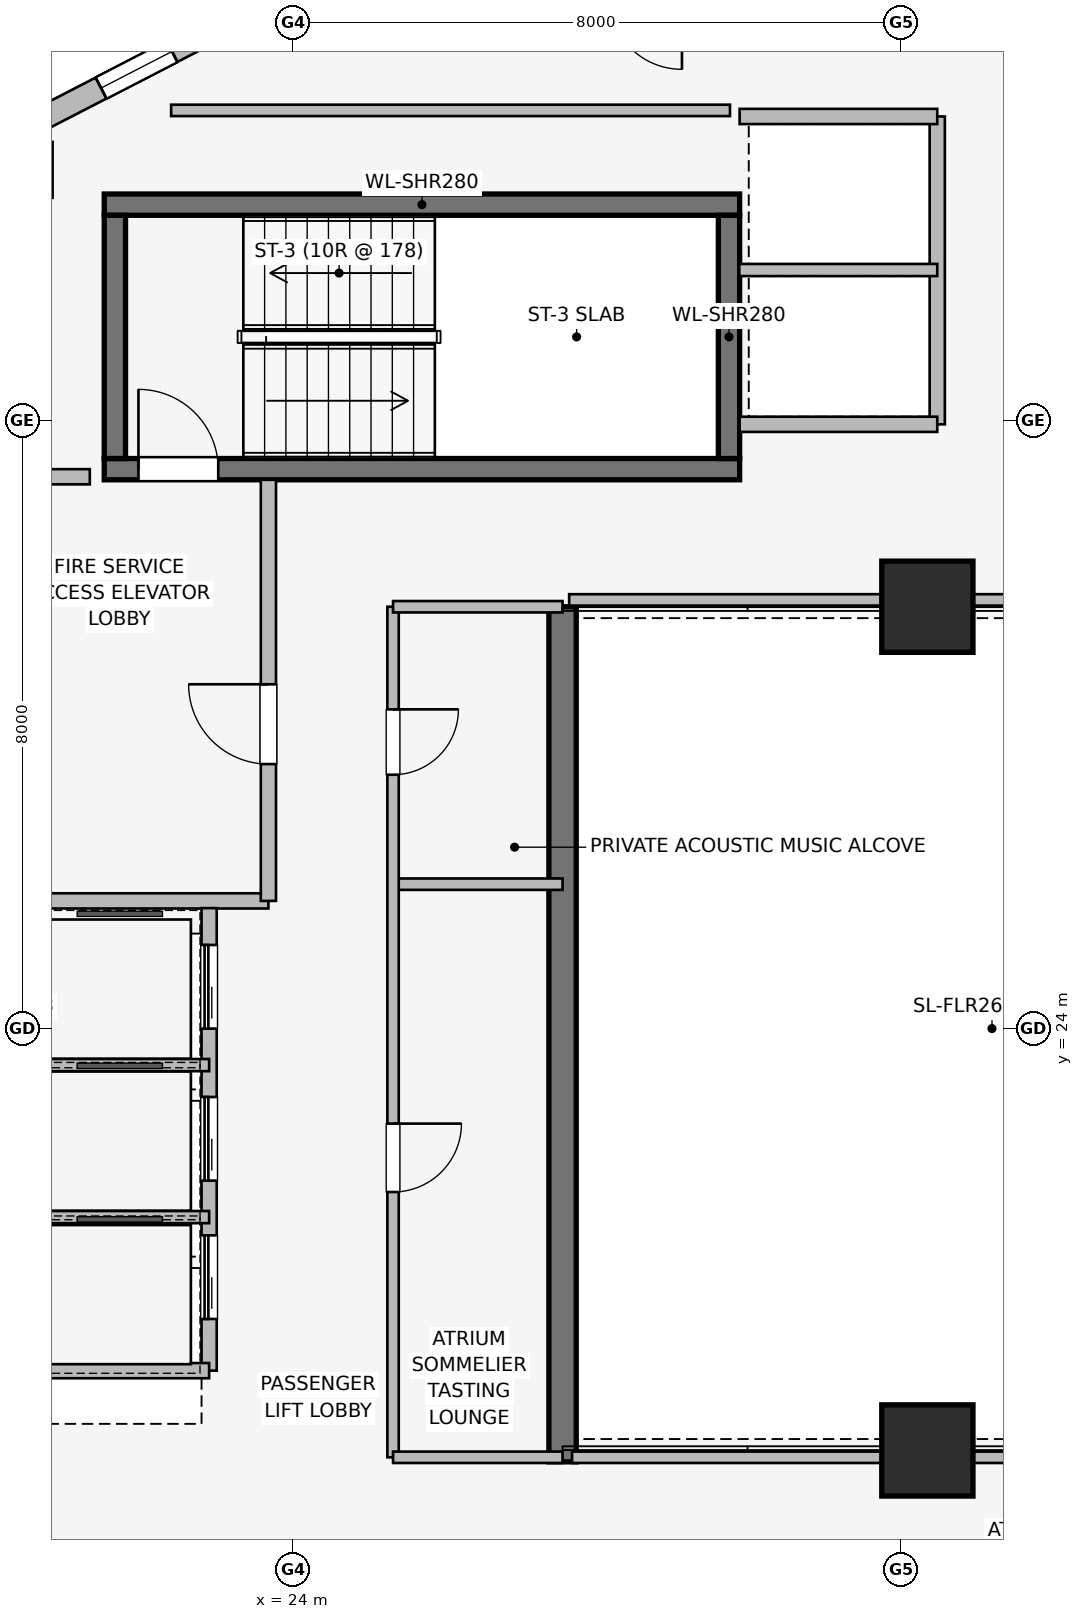
"""IFC4 building model, lengths in metres.
Left out: names, types, materials, properties, quantities, classifications, styles, units other than length and angle.
Written with IfcOpenShell. Run it as: python <this file> out.ifc"""

import sys

from ifc_helpers import new_model, si_unit, direction, frame, frame_2d, origin, origin_2d, place, context, subcontext, project, spatial, rectangle, extrude, element, fill, save


model = new_model("IFC4")
c1 = context("Model", 3, precision=1e-05, world=origin(), true_north=direction((0.0, 1.0)))
c2 = subcontext(c1, "Body", "Model", "MODEL_VIEW")
j1 = project(units=[si_unit("LENGTHUNIT", "METRE"), si_unit("PLANEANGLEUNIT", "RADIAN")], contexts=[c1])
p1 = place(None, origin())
s1 = spatial("IfcSite", under=j1, at=p1, CompositionType="ELEMENT")
p2 = place(p1, origin())
s2 = spatial("IfcBuilding", under=s1, at=p2, CompositionType="ELEMENT")
p3 = place(p2, frame((0.0, 0.0, 224.15)))
s3 = spatial("IfcBuildingStorey", under=s2, at=p3, CompositionType="ELEMENT", Elevation=224.15)
p4 = place(p3, frame((27.55, 29.55, 0.0), z_axis=(0.0, 0.0, 1.0), x_axis=(0.0, -1.0, 0.0)))
e1 = element("IfcWall", 1, at=p4, inside=s3, PredefinedType="SHEAR", context=c2, shape_type="SweptSolid", body=[
    extrude(rectangle(XDim=11.25, YDim=0.36, at=frame_2d((5.625, 0.0))), origin(), (0.0, 0.0, 1.0), 3.55),
])
p5 = place(p3, frame((21.52, 31.36, 0.0), z_axis=(0.0, 0.0, 1.0), x_axis=(1.0, 0.0, 0.0)))
e2 = element("IfcWall", 2, at=p5, inside=s3, PredefinedType="SHEAR", context=c2, shape_type="SweptSolid", body=[
    extrude(rectangle(XDim=8.36, YDim=0.28, at=frame_2d((4.18, 0.0))), origin(), (0.0, 0.0, 1.0), 3.55),
])
p6 = place(p5, frame((0.45, 0.0, 0.0)))
e3 = element("IfcOpeningElement", 3, at=p6, cuts=e2, PredefinedType="OPENING", context=c2, shape_type="SweptSolid", body=[
    extrude(rectangle(XDim=1.05, YDim=2.0, at=frame_2d((0.525, 1.0))), frame((0.0, 0.15, 0.0), z_axis=(0.0, -1.0, 0.0), x_axis=(1.0, 0.0, 0.0)), (0.0, 0.0, 1.0), 0.3),
])
p7 = place(p3, frame((29.88, 34.84, 0.0), z_axis=(0.0, 0.0, 1.0), x_axis=(-1.0, 0.0, 0.0)))
e4 = element("IfcWall", 4, at=p7, inside=s3, PredefinedType="SHEAR", context=c2, shape_type="SweptSolid", body=[
    extrude(rectangle(XDim=8.36, YDim=0.28, at=frame_2d((4.18, 0.0))), origin(), (0.0, 0.0, 1.0), 3.55),
])
for number, where, z_axis, x_axis in (
    (5, (21.66, 34.7, 0.0), (0.0, 0.0, 1.0), (0.0, -1.0, 0.0)),
    (6, (29.74, 31.5, 0.0), (0.0, 0.0, 1.0), (0.0, 1.0, 0.0)),
):
    element("IfcWall", number, at=place(p3, frame(where, z_axis=z_axis, x_axis=x_axis)), inside=s3, PredefinedType="SHEAR", context=c2, shape_type="SweptSolid", body=[
        extrude(rectangle(XDim=3.2, YDim=0.28, at=frame_2d((1.6, 0.0))), origin(), (0.0, 0.0, 1.0), 3.55),
    ])
for number, where, z_axis, x_axis in (
    (7, (32.35, 18.45, 0.0), (0.0, 0.0, 1.0), (1.0, 0.0, 0.0)),
    (8, (32.35, 29.55, 0.0), (0.0, 0.0, 1.0), (1.0, 0.0, 0.0)),
):
    element("IfcColumn", number, at=place(p3, frame(where, z_axis=z_axis, x_axis=x_axis)), inside=s3, PredefinedType="COLUMN", context=c2, shape_type="SweptSolid", body=[
        extrude(rectangle(XDim=1.2, YDim=1.2, at=origin_2d()), origin(), (0.0, 0.0, 1.0), 3.55),
    ])
p8 = place(p3, frame((17.566, 34.354, 0.0), z_axis=(0.0, 0.0, 1.0), x_axis=(0.888581481622, 0.458718814218, 0.0)))
e9 = element("IfcWall", 9, at=p8, inside=s3, PredefinedType="STANDARD", context=c2, shape_type="SweptSolid", body=[
    extrude(rectangle(XDim=15.077, YDim=0.31, at=frame_2d((7.539, 0.0))), origin(), (0.0, 0.0, 1.0), 3.29),
])
p9 = place(p8, frame((0.998, 0.0, 0.75)))
e10 = element("IfcOpeningElement", 10, at=p9, cuts=e9, PredefinedType="OPENING", context=c2, shape_type="SweptSolid", body=[
    extrude(rectangle(XDim=1.05, YDim=1.4, at=frame_2d((0.525, 0.7))), frame((0.0, 0.165, 0.0), z_axis=(0.0, -1.0, 0.0), x_axis=(1.0, 0.0, 0.0)), (0.0, 0.0, 1.0), 0.33),
])
p10 = place(p8, frame((4.403, 0.0, 0.75)))
e11 = element("IfcOpeningElement", 11, at=p10, cuts=e9, PredefinedType="OPENING", context=c2, shape_type="SweptSolid", body=[
    extrude(rectangle(XDim=1.05, YDim=1.4, at=frame_2d((0.525, 0.7))), frame((0.0, 0.165, 0.0), z_axis=(0.0, -1.0, 0.0), x_axis=(1.0, 0.0, 0.0)), (0.0, 0.0, 1.0), 0.33),
])
p11 = place(p8, frame((8.086, 0.0, 0.75)))
e12 = element("IfcOpeningElement", 12, at=p11, cuts=e9, PredefinedType="OPENING", context=c2, shape_type="SweptSolid", body=[
    extrude(rectangle(XDim=2.4, YDim=1.6, at=frame_2d((1.2, 0.8))), frame((0.0, 0.165, 0.0), z_axis=(0.0, -1.0, 0.0), x_axis=(1.0, 0.0, 0.0)), (0.0, 0.0, 1.0), 0.33),
])
p12 = place(p8, frame((13.029, 0.0, 0.75)))
e13 = element("IfcOpeningElement", 13, at=p12, cuts=e9, PredefinedType="OPENING", context=c2, shape_type="SweptSolid", body=[
    extrude(rectangle(XDim=1.05, YDim=1.4, at=frame_2d((0.525, 0.7))), frame((0.0, 0.165, 0.0), z_axis=(0.0, -1.0, 0.0), x_axis=(1.0, 0.0, 0.0)), (0.0, 0.0, 1.0), 0.33),
])
p13 = place(p3, frame((20.793, 25.68, 0.0), z_axis=(0.0, 0.0, 1.0), x_axis=(1.0, 0.0, 0.0)))
e14 = element("IfcWall", 14, at=p13, inside=s3, PredefinedType="PARTITIONING", context=c2, shape_type="SweptSolid", body=[
    extrude(rectangle(XDim=2.887, YDim=0.2, at=frame_2d((1.443, 0.0))), origin(), (0.0, 0.0, 1.0), 3.29),
])
p14 = place(p3, frame((23.68, 25.68, 0.0), z_axis=(0.0, 0.0, 1.0), x_axis=(0.0, 1.0, 0.0)))
e15 = element("IfcWall", 15, at=p14, inside=s3, PredefinedType="PARTITIONING", context=c2, shape_type="SweptSolid", body=[
    extrude(rectangle(XDim=5.54, YDim=0.2, at=frame_2d((2.77, 0.0))), origin(), (0.0, 0.0, 1.0), 3.29),
])
p15 = place(p14, frame((1.8, 0.0, 0.0)))
e16 = element("IfcOpeningElement", 16, at=p15, cuts=e15, PredefinedType="OPENING", context=c2, shape_type="SweptSolid", body=[
    extrude(rectangle(XDim=1.05, YDim=2.0, at=frame_2d((0.525, 1.0))), frame((0.0, 0.11, 0.0), z_axis=(0.0, -1.0, 0.0), x_axis=(1.0, 0.0, 0.0)), (0.0, 0.0, 1.0), 0.22),
])
p16 = place(p3, frame((21.33, 31.26, 0.0), z_axis=(0.0, 0.0, 1.0), x_axis=(-1.0, 0.0, 0.0)))
e17 = element("IfcWall", 17, at=p16, inside=s3, PredefinedType="PARTITIONING", context=c2, shape_type="SweptSolid", body=[
    extrude(rectangle(XDim=1.68, YDim=0.2, at=frame_2d((0.84, 0.0))), origin(), (0.0, 0.0, 1.0), 3.29),
])
p17 = place(p3, frame((32.48, 31.95, 0.0), z_axis=(0.0, 0.0, 1.0), x_axis=(0.0, 1.0, 0.0)))
e18 = element("IfcWall", 18, at=p17, inside=s3, PredefinedType="PARTITIONING", context=c2, shape_type="SweptSolid", body=[
    extrude(rectangle(XDim=4.05, YDim=0.2, at=frame_2d((2.025, 0.0))), origin(), (0.0, 0.0, 1.0), 3.29),
])
for number, where, z_axis, x_axis in (
    (19, (29.88, 36.0, 0.0), (0.0, 0.0, 1.0), (1.0, 0.0, 0.0)),
    (20, (32.48, 31.95, 0.0), (0.0, 0.0, 1.0), (-1.0, 0.0, 0.0)),
):
    element("IfcWall", number, at=place(p3, frame(where, z_axis=z_axis, x_axis=x_axis)), inside=s3, PredefinedType="PARTITIONING", context=c2, shape_type="SweptSolid", body=[
        extrude(rectangle(XDim=2.6, YDim=0.2, at=frame_2d((1.3, 0.0))), origin(), (0.0, 0.0, 1.0), 3.29),
    ])
p18 = place(p3, frame((29.875, 33.98, 0.0), z_axis=(0.0, 0.0, 1.0), x_axis=(1.0, 0.0, 0.0)))
e21 = element("IfcWall", 21, at=p18, inside=s3, PredefinedType="PARTITIONING", context=c2, shape_type="SweptSolid", body=[
    extrude(rectangle(XDim=2.605, YDim=0.16, at=frame_2d((1.302, 0.0))), origin(), (0.0, 0.0, 1.0), 3.29),
])
p19 = place(p3, frame((22.9, 19.5, 0.0), z_axis=(0.0, 0.0, 1.0), x_axis=(0.0, 1.0, 0.0)))
e22 = element("IfcWall", 22, at=p19, inside=s3, PredefinedType="PARTITIONING", context=c2, shape_type="SweptSolid", body=[
    extrude(rectangle(XDim=6.085, YDim=0.2, at=frame_2d((3.042, 0.0))), origin(), (0.0, 0.0, 1.0), 3.29),
])
p20 = place(p19, frame((0.68, 0.0, 0.0)))
e23 = element("IfcOpeningElement", 23, at=p20, cuts=e22, PredefinedType="OPENING", context=c2, shape_type="SweptSolid", body=[
    extrude(rectangle(XDim=1.1, YDim=2.2, at=frame_2d((0.55, 1.1))), frame((0.0, 0.11, 0.0), z_axis=(0.0, -1.0, 0.0), x_axis=(1.0, 0.0, 0.0)), (0.0, 0.0, 1.0), 0.22),
])
p21 = place(p19, frame((2.5, 0.0, 0.0)))
e24 = element("IfcOpeningElement", 24, at=p21, cuts=e22, PredefinedType="OPENING", context=c2, shape_type="SweptSolid", body=[
    extrude(rectangle(XDim=1.1, YDim=2.2, at=frame_2d((0.55, 1.1))), frame((0.0, 0.11, 0.0), z_axis=(0.0, -1.0, 0.0), x_axis=(1.0, 0.0, 0.0)), (0.0, 0.0, 1.0), 0.22),
])
p22 = place(p19, frame((4.5, 0.0, 0.0)))
e25 = element("IfcOpeningElement", 25, at=p22, cuts=e22, PredefinedType="OPENING", context=c2, shape_type="SweptSolid", body=[
    extrude(rectangle(XDim=1.1, YDim=2.2, at=frame_2d((0.55, 1.1))), frame((0.0, 0.11, 0.0), z_axis=(0.0, -1.0, 0.0), x_axis=(1.0, 0.0, 0.0)), (0.0, 0.0, 1.0), 0.22),
])
p23 = place(p3, frame((20.49, 19.5, 0.0), z_axis=(0.0, 0.0, 1.0), x_axis=(1.0, 0.0, 0.0)))
e26 = element("IfcWall", 26, at=p23, inside=s3, PredefinedType="PARTITIONING", context=c2, shape_type="SweptSolid", body=[
    extrude(rectangle(XDim=2.41, YDim=0.2, at=frame_2d((1.205, 0.0))), origin(), (0.0, 0.0, 1.0), 2.19),
])
for number, where, z_axis, x_axis in (
    (27, (20.55, 21.52, 0.0), (0.0, 0.0, 1.0), (1.0, 0.0, 0.0)),
    (28, (20.55, 23.52, 0.0), (0.0, 0.0, 1.0), (1.0, 0.0, 0.0)),
):
    element("IfcWall", number, at=place(p3, frame(where, z_axis=z_axis, x_axis=x_axis)), inside=s3, PredefinedType="PARTITIONING", context=c2, shape_type="SweptSolid", body=[
        extrude(rectangle(XDim=2.35, YDim=0.16, at=frame_2d((1.175, 0.0))), origin(), (0.0, 0.0, 1.0), 3.29),
    ])
p24 = place(p3, frame((25.32, 25.9, 0.0), z_axis=(0.0, 0.0, 1.0), x_axis=(1.0, 0.0, 0.0)))
e29 = element("IfcWall", 29, at=p24, inside=s3, PredefinedType="PARTITIONING", context=c2, shape_type="SweptSolid", body=[
    extrude(rectangle(XDim=2.23, YDim=0.15, at=frame_2d((1.115, 0.0))), origin(), (0.0, 0.0, 1.0), 3.29),
])
p25 = place(p3, frame((25.32, 29.55, 0.0), z_axis=(0.0, 0.0, 1.0), x_axis=(0.0, -1.0, 0.0)))
e30 = element("IfcWall", 30, at=p25, inside=s3, PredefinedType="PARTITIONING", context=c2, shape_type="SweptSolid", body=[
    extrude(rectangle(XDim=11.19, YDim=0.15, at=frame_2d((5.595, 0.0))), origin(), (0.0, 0.0, 1.0), 3.29),
])
p26 = place(p25, frame((1.35, 0.0, 0.0)))
e31 = element("IfcOpeningElement", 31, at=p26, cuts=e30, PredefinedType="OPENING", context=c2, shape_type="SweptSolid", body=[
    extrude(rectangle(XDim=0.86, YDim=2.0, at=frame_2d((0.43, 1.0))), frame((0.0, 0.085, 0.0), z_axis=(0.0, -1.0, 0.0), x_axis=(1.0, 0.0, 0.0)), (0.0, 0.0, 1.0), 0.17),
])
p27 = place(p25, frame((6.8, 0.0, 0.0)))
e32 = element("IfcOpeningElement", 32, at=p27, cuts=e30, PredefinedType="OPENING", context=c2, shape_type="SweptSolid", body=[
    extrude(rectangle(XDim=0.9, YDim=2.0, at=frame_2d((0.45, 1.0))), frame((0.0, 0.085, 0.0), z_axis=(0.0, -1.0, 0.0), x_axis=(1.0, 0.0, 0.0)), (0.0, 0.0, 1.0), 0.17),
])
p28 = place(p3, frame((25.32, 18.36, 0.0), z_axis=(0.0, 0.0, 1.0), x_axis=(1.0, 0.0, 0.0)))
e33 = element("IfcWall", 33, at=p28, inside=s3, PredefinedType="PARTITIONING", context=c2, shape_type="SweptSolid", body=[
    extrude(rectangle(XDim=2.23, YDim=0.15, at=frame_2d((1.115, 0.0))), origin(), (0.0, 0.0, 1.0), 3.29),
])
p29 = place(p3, frame((27.55, 29.55, 0.0), z_axis=(0.0, 0.0, 1.0), x_axis=(-1.0, 0.0, 0.0)))
e34 = element("IfcWall", 34, at=p29, inside=s3, PredefinedType="PARTITIONING", context=c2, shape_type="SweptSolid", body=[
    extrude(rectangle(XDim=2.23, YDim=0.15, at=frame_2d((1.115, 0.0))), origin(), (0.0, 0.0, 1.0), 2.19),
])
p30 = place(p3, frame((27.675, 18.36, 0.0), z_axis=(0.0, 0.0, 1.0), x_axis=(1.0, 0.0, 0.0)))
e35 = element("IfcWall", 35, at=p30, inside=s3, PredefinedType="PARTITIONING", context=c2, shape_type="SweptSolid", body=[
    extrude(rectangle(XDim=12.165, YDim=0.15, at=frame_2d((6.083, 0.0))), origin(), (0.0, 0.0, 1.0), 2.431),
])
p31 = place(p3, frame((39.84, 29.64, 0.0), z_axis=(0.0, 0.0, 1.0), x_axis=(-1.0, 0.0, 0.0)))
e36 = element("IfcWall", 36, at=p31, inside=s3, PredefinedType="PARTITIONING", context=c2, shape_type="SweptSolid", body=[
    extrude(rectangle(XDim=12.203, YDim=0.15, at=frame_2d((6.102, 0.0))), origin(), (0.0, 0.0, 1.0), 2.431),
])
p32 = place(p3, frame((29.753, 36.08, 0.0), z_axis=(0.0, 0.0, 1.0), x_axis=(-1.0, 0.0, 0.0)))
e37 = element("IfcWall", 37, at=p32, inside=s3, PredefinedType="PARTITIONING", context=c2, shape_type="SweptSolid", body=[
    extrude(rectangle(XDim=7.353, YDim=0.15, at=frame_2d((3.677, 0.0))), origin(), (0.0, 0.0, 1.0), 2.682),
])
p33 = place(p10, origin())
e38 = element("IfcWindow", 38, at=p33, inside=s3, PartitioningType="SINGLE_PANEL", PredefinedType="WINDOW", context=c2, shape_type="SweptSolid", body=[
    extrude(rectangle(XDim=1.05, YDim=1.4, at=frame_2d((0.525, 0.7))), frame((0.0, 0.03, 0.0), z_axis=(0.0, -1.0, 0.0), x_axis=(1.0, 0.0, 0.0)), (0.0, 0.0, 1.0), 0.06),
])
fill(e11, e38)
p34 = place(p6, origin())
e39 = element("IfcDoor", 39, at=p34, inside=s3, OperationType="SINGLE_SWING_LEFT", PredefinedType="DOOR", context=c2, shape_type="SweptSolid", body=[
    extrude(rectangle(XDim=1.05, YDim=2.0, at=frame_2d((0.525, 1.0))), frame((0.0, 0.025, 0.0), z_axis=(0.0, -1.0, 0.0), x_axis=(1.0, 0.0, 0.0)), (0.0, 0.0, 1.0), 0.05),
])
fill(e3, e39)
p35 = place(p15, origin())
e40 = element("IfcDoor", 40, at=p35, inside=s3, OperationType="SINGLE_SWING_RIGHT", PredefinedType="DOOR", context=c2, shape_type="SweptSolid", body=[
    extrude(rectangle(XDim=1.05, YDim=2.0, at=frame_2d((0.525, 1.0))), frame((0.0, 0.025, 0.0), z_axis=(0.0, -1.0, 0.0), x_axis=(1.0, 0.0, 0.0)), (0.0, 0.0, 1.0), 0.05),
])
fill(e16, e40)
p36 = place(p20, origin())
e41 = element("IfcDoor", 41, at=p36, inside=s3, OperationType="SLIDING_TO_LEFT", PredefinedType="DOOR", context=c2, shape_type="SweptSolid", body=[
    extrude(rectangle(XDim=1.1, YDim=2.2, at=frame_2d((0.55, 1.1))), frame((0.0, 0.025, 0.0), z_axis=(0.0, -1.0, 0.0), x_axis=(1.0, 0.0, 0.0)), (0.0, 0.0, 1.0), 0.05),
])
fill(e23, e41)
p37 = place(p21, origin())
e42 = element("IfcDoor", 42, at=p37, inside=s3, OperationType="SLIDING_TO_LEFT", PredefinedType="DOOR", context=c2, shape_type="SweptSolid", body=[
    extrude(rectangle(XDim=1.1, YDim=2.2, at=frame_2d((0.55, 1.1))), frame((0.0, 0.025, 0.0), z_axis=(0.0, -1.0, 0.0), x_axis=(1.0, 0.0, 0.0)), (0.0, 0.0, 1.0), 0.05),
])
fill(e24, e42)
p38 = place(p22, origin())
e43 = element("IfcDoor", 43, at=p38, inside=s3, OperationType="SLIDING_TO_LEFT", PredefinedType="DOOR", context=c2, shape_type="SweptSolid", body=[
    extrude(rectangle(XDim=1.1, YDim=2.2, at=frame_2d((0.55, 1.1))), frame((0.0, 0.025, 0.0), z_axis=(0.0, -1.0, 0.0), x_axis=(1.0, 0.0, 0.0)), (0.0, 0.0, 1.0), 0.05),
])
fill(e25, e43)
p39 = place(p26, origin())
e44 = element("IfcDoor", 44, at=p39, inside=s3, OperationType="SINGLE_SWING_LEFT", PredefinedType="DOOR", context=c2, shape_type="SweptSolid", body=[
    extrude(rectangle(XDim=0.86, YDim=2.0, at=frame_2d((0.43, 1.0))), frame((0.0, 0.025, 0.0), z_axis=(0.0, -1.0, 0.0), x_axis=(1.0, 0.0, 0.0)), (0.0, 0.0, 1.0), 0.05),
])
fill(e31, e44)
p40 = place(p27, origin())
e45 = element("IfcDoor", 45, at=p40, inside=s3, OperationType="SINGLE_SWING_LEFT", PredefinedType="DOOR", context=c2, shape_type="SweptSolid", body=[
    extrude(rectangle(XDim=0.9, YDim=2.0, at=frame_2d((0.45, 1.0))), frame((0.0, 0.025, 0.0), z_axis=(0.0, -1.0, 0.0), x_axis=(1.0, 0.0, 0.0)), (0.0, 0.0, 1.0), 0.05),
])
fill(e32, e45)
save(model, sys.argv[1])
